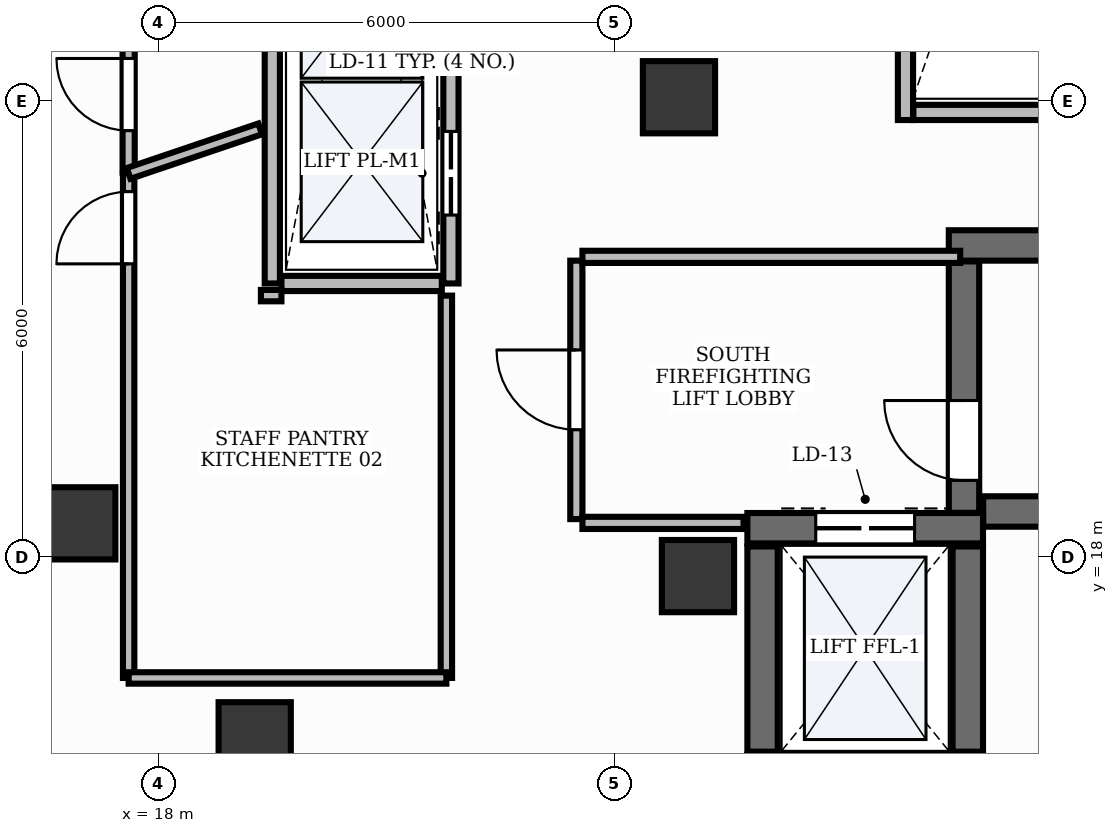
"""IFC4 building model, lengths in metres.
Left out: names, types, materials, properties, quantities, classifications, styles, units other than length and angle.
Written with IfcOpenShell. Run it as: python <this file> out.ifc"""

import sys

from ifc_helpers import new_model, si_unit, direction, frame, frame_2d, origin, origin_2d, place, context, subcontext, project, spatial, rectangle, extrude, element, fill, save


model = new_model("IFC4")
c1 = context("Model", 3, precision=1e-05, world=origin(), true_north=direction((0.0, 1.0)))
c2 = subcontext(c1, "Body", "Model", "MODEL_VIEW")
j1 = project(units=[si_unit("LENGTHUNIT", "METRE"), si_unit("PLANEANGLEUNIT", "RADIAN")], contexts=[c1])
p1 = place(None, origin())
s1 = spatial("IfcSite", under=j1, at=p1, CompositionType="ELEMENT")
p2 = place(p1, origin())
s2 = spatial("IfcBuilding", under=s1, at=p2, CompositionType="ELEMENT")
p3 = place(p2, frame((0.0, 0.0, 231.0)))
s3 = spatial("IfcBuildingStorey", under=s2, at=p3, CompositionType="ELEMENT", Elevation=231.0)
p4 = place(p3, frame((28.852, 18.6, 0.0), z_axis=(0.0, 0.0, 1.0), x_axis=(1.0, 0.0, 0.0)))
e1 = element("IfcWall", 1, at=p4, inside=s3, PredefinedType="SHEAR", context=c2, shape_type="SweptSolid", body=[
    extrude(rectangle(XDim=8.198, YDim=0.4, at=frame_2d((4.099, 0.0))), origin(), (0.0, 0.0, 1.0), 3.9),
])
p5 = place(p3, frame((28.4, 22.1, 0.0), z_axis=(0.0, 0.0, 1.0), x_axis=(1.0, 0.0, 0.0)))
e2 = element("IfcWall", 2, at=p5, inside=s3, PredefinedType="SHEAR", context=c2, shape_type="SweptSolid", body=[
    extrude(rectangle(XDim=8.65, YDim=0.4, at=frame_2d((4.325, 0.0))), origin(), (0.0, 0.0, 1.0), 3.9),
])
p6 = place(p3, frame((28.6, 18.582, 0.0), z_axis=(0.0, 0.0, 1.0), x_axis=(0.0, 1.0, 0.0)))
e3 = element("IfcWall", 3, at=p6, inside=s3, PredefinedType="SHEAR", context=c2, shape_type="SweptSolid", body=[
    extrude(rectangle(XDim=3.308, YDim=0.4, at=frame_2d((1.654, 0.0))), origin(), (0.0, 0.0, 1.0), 3.9),
])
p7 = place(p6, frame((0.428, 0.0, 0.0)))
e4 = element("IfcOpeningElement", 4, at=p7, cuts=e3, PredefinedType="OPENING", context=c2, shape_type="SweptSolid", body=[
    extrude(rectangle(XDim=1.05, YDim=2.15, at=frame_2d((0.525, 1.075))), frame((0.0, 0.215, 0.0), z_axis=(0.0, -1.0, 0.0), x_axis=(1.0, 0.0, 0.0)), (0.0, 0.0, 1.0), 0.43),
])
p8 = place(p3, frame((25.75, 18.38, 0.0), z_axis=(0.0, 0.0, 1.0), x_axis=(1.0, 0.0, 0.0)))
e5 = element("IfcWall", 5, at=p8, inside=s3, PredefinedType="SHEAR", context=c2, shape_type="SweptSolid", body=[
    extrude(rectangle(XDim=3.1, YDim=0.4, at=frame_2d((1.55, 0.0))), origin(), (0.0, 0.0, 1.0), 3.9),
])
p9 = place(p8, frame((0.9, 0.0, 0.0)))
e6 = element("IfcOpeningElement", 6, at=p9, cuts=e5, PredefinedType="OPENING", context=c2, shape_type="SweptSolid", body=[
    extrude(rectangle(XDim=1.3, YDim=2.2, at=frame_2d((0.65, 1.1))), frame((0.0, 0.215, 0.0), z_axis=(0.0, -1.0, 0.0), x_axis=(1.0, 0.0, 0.0)), (0.0, 0.0, 1.0), 0.43),
])
for number, where, z_axis, x_axis in (
    (7, (25.95, 15.44, 0.0), (0.0, 0.0, 1.0), (0.0, 1.0, 0.0)),
    (8, (28.65, 15.44, 0.0), (0.0, 0.0, 1.0), (0.0, 1.0, 0.0)),
):
    element("IfcWall", number, at=place(p3, frame(where, z_axis=z_axis, x_axis=x_axis)), inside=s3, PredefinedType="SHEAR", context=c2, shape_type="SweptSolid", body=[
        extrude(rectangle(XDim=2.7, YDim=0.4, at=frame_2d((1.35, 0.0))), origin(), (0.0, 0.0, 1.0), 3.9),
    ])
for number, where, z_axis, x_axis in (
    (9, (24.85, 24.05, -0.0), (0.0, 0.0, 1.0), (1.0, 0.0, 0.0)),
    (10, (25.1, 17.75, -0.0), (0.0, 0.0, 1.0), (1.0, 0.0, 0.0)),
):
    element("IfcColumn", number, at=place(p3, frame(where, z_axis=z_axis, x_axis=x_axis)), inside=s3, PredefinedType="PILASTER", context=c2, shape_type="SweptSolid", body=[
        extrude(rectangle(XDim=0.95, YDim=0.95, at=origin_2d()), origin(), (0.0, 0.0, 1.0), 3.901),
    ])
for number, where, z_axis, x_axis in (
    (11, (16.96, 18.444, -0.0), (0.0, 0.0, 1.0), (1.0, 0.0, 0.0)),
    (12, (19.268, 15.616, -0.0), (0.0, 0.0, 1.0), (1.0, 0.0, 0.0)),
):
    element("IfcColumn", number, at=place(p3, frame(where, z_axis=z_axis, x_axis=x_axis)), inside=s3, PredefinedType="COLUMN", context=c2, shape_type="SweptSolid", body=[
        extrude(rectangle(XDim=0.95, YDim=0.95, at=origin_2d()), origin(), (0.0, 0.0, 1.0), 3.901),
    ])
p10 = place(p3, frame((19.5, 21.6, 0.0), z_axis=(0.0, 0.0, 1.0), x_axis=(0.0, 1.0, 0.0)))
e13 = element("IfcWall", 13, at=p10, inside=s3, PredefinedType="PARTITIONING", context=c2, shape_type="SweptSolid", body=[
    extrude(rectangle(XDim=10.8, YDim=0.2, at=frame_2d((5.4, 0.0))), origin(), (0.0, 0.0, 1.0), 2.91),
])
p11 = place(p3, frame((21.85, 21.6, 0.0), z_axis=(0.0, 0.0, 1.0), x_axis=(0.0, 1.0, 0.0)))
e14 = element("IfcWall", 14, at=p11, inside=s3, PredefinedType="PARTITIONING", context=c2, shape_type="SweptSolid", body=[
    extrude(rectangle(XDim=10.8, YDim=0.2, at=frame_2d((5.4, 0.0))), origin(), (0.0, 0.0, 1.0), 2.91),
])
p12 = place(p11, frame((0.9, 0.0, 0.0)))
e15 = element("IfcOpeningElement", 15, at=p12, cuts=e14, PredefinedType="OPENING", context=c2, shape_type="SweptSolid", body=[
    extrude(rectangle(XDim=1.1, YDim=2.2, at=frame_2d((0.55, 1.1))), frame((0.0, 0.115, 0.0), z_axis=(0.0, -1.0, 0.0), x_axis=(1.0, 0.0, 0.0)), (0.0, 0.0, 1.0), 0.23),
])
p13 = place(p11, frame((3.6, 0.0, 0.0)))
e16 = element("IfcOpeningElement", 16, at=p13, cuts=e14, PredefinedType="OPENING", context=c2, shape_type="SweptSolid", body=[
    extrude(rectangle(XDim=1.1, YDim=2.2, at=frame_2d((0.55, 1.1))), frame((0.0, 0.115, 0.0), z_axis=(0.0, -1.0, 0.0), x_axis=(1.0, 0.0, 0.0)), (0.0, 0.0, 1.0), 0.23),
])
p14 = place(p11, frame((6.3, 0.0, 0.0)))
e17 = element("IfcOpeningElement", 17, at=p14, cuts=e14, PredefinedType="OPENING", context=c2, shape_type="SweptSolid", body=[
    extrude(rectangle(XDim=1.1, YDim=2.2, at=frame_2d((0.55, 1.1))), frame((0.0, 0.115, 0.0), z_axis=(0.0, -1.0, 0.0), x_axis=(1.0, 0.0, 0.0)), (0.0, 0.0, 1.0), 0.23),
])
p15 = place(p11, frame((9.0, 0.0, 0.0)))
e18 = element("IfcOpeningElement", 18, at=p15, cuts=e14, PredefinedType="OPENING", context=c2, shape_type="SweptSolid", body=[
    extrude(rectangle(XDim=1.1, YDim=2.2, at=frame_2d((0.55, 1.1))), frame((0.0, 0.115, 0.0), z_axis=(0.0, -1.0, 0.0), x_axis=(1.0, 0.0, 0.0)), (0.0, 0.0, 1.0), 0.23),
])
p16 = place(p3, frame((19.62, 21.6, 0.0), z_axis=(0.0, 0.0, 1.0), x_axis=(1.0, 0.0, 0.0)))
e19 = element("IfcWall", 19, at=p16, inside=s3, PredefinedType="PARTITIONING", context=c2, shape_type="SweptSolid", body=[
    extrude(rectangle(XDim=2.11, YDim=0.2, at=frame_2d((1.055, 0.0))), origin(), (0.0, 0.0, 1.0), 2.91),
])
p17 = place(p3, frame((27.83, 23.75, 0.0), z_axis=(0.0, 0.0, 1.0), x_axis=(0.0, 1.0, 0.0)))
e20 = element("IfcWall", 20, at=p17, inside=s3, PredefinedType="PARTITIONING", context=c2, shape_type="SweptSolid", body=[
    extrude(rectangle(XDim=1.366, YDim=0.2, at=frame_2d((0.683, 0.0))), origin(), (0.0, 0.0, 1.0), 2.91),
])
p18 = place(p3, frame((27.934, 23.85, 0.0), z_axis=(0.0, 0.0, 1.0), x_axis=(1.0, 0.0, 0.0)))
e21 = element("IfcWall", 21, at=p18, inside=s3, PredefinedType="PARTITIONING", context=c2, shape_type="SweptSolid", body=[
    extrude(rectangle(XDim=2.096, YDim=0.2, at=frame_2d((1.048, 0.0))), origin(), (0.0, 0.0, 1.0), 2.91),
])
p19 = place(p3, frame((23.5, 18.5, 0.0), z_axis=(0.0, 0.0, 1.0), x_axis=(0.0, 1.0, 0.0)))
e22 = element("IfcWall", 22, at=p19, inside=s3, PredefinedType="PARTITIONING", context=c2, shape_type="SweptSolid", body=[
    extrude(rectangle(XDim=3.4, YDim=0.16, at=frame_2d((1.7, 0.0))), origin(), (0.0, 0.0, 1.0), 2.91),
])
p20 = place(p19, frame((1.175, 0.0, 0.0)))
e23 = element("IfcOpeningElement", 23, at=p20, cuts=e22, PredefinedType="OPENING", context=c2, shape_type="SweptSolid", body=[
    extrude(rectangle(XDim=1.05, YDim=2.15, at=frame_2d((0.525, 1.075))), frame((0.0, 0.095, 0.0), z_axis=(0.0, -1.0, 0.0), x_axis=(1.0, 0.0, 0.0)), (0.0, 0.0, 1.0), 0.19),
])
p21 = place(p3, frame((23.58, 21.95, 0.0), z_axis=(0.0, 0.0, 1.0), x_axis=(1.0, 0.0, 0.0)))
e24 = element("IfcWall", 24, at=p21, inside=s3, PredefinedType="PARTITIONING", context=c2, shape_type="SweptSolid", body=[
    extrude(rectangle(XDim=4.97, YDim=0.16, at=frame_2d((2.485, 0.0))), origin(), (0.0, 0.0, 1.0), 2.91),
])
p22 = place(p3, frame((23.58, 18.45, 0.0), z_axis=(0.0, 0.0, 1.0), x_axis=(1.0, 0.0, 0.0)))
e25 = element("IfcWall", 25, at=p22, inside=s3, PredefinedType="PARTITIONING", context=c2, shape_type="SweptSolid", body=[
    extrude(rectangle(XDim=2.12, YDim=0.16, at=frame_2d((1.06, 0.0))), origin(), (0.0, 0.0, 1.0), 2.91),
])
p23 = place(p3, frame((17.61, 16.41, 0.0), z_axis=(0.0, 0.0, 1.0), x_axis=(0.0, 1.0, 0.0)))
e26 = element("IfcWall", 26, at=p23, inside=s3, PredefinedType="PARTITIONING", context=c2, shape_type="SweptSolid", body=[
    extrude(rectangle(XDim=6.638, YDim=0.15, at=frame_2d((3.319, 0.0))), origin(), (0.0, 0.0, 1.0), 2.91),
])
p24 = place(p23, frame((5.448, 0.0, 0.0)))
e27 = element("IfcOpeningElement", 27, at=p24, cuts=e26, PredefinedType="OPENING", context=c2, shape_type="SweptSolid", body=[
    extrude(rectangle(XDim=0.95, YDim=2.15, at=frame_2d((0.475, 1.075))), frame((0.0, 0.09, 0.0), z_axis=(0.0, -1.0, 0.0), x_axis=(1.0, 0.0, 0.0)), (0.0, 0.0, 1.0), 0.18),
])
p25 = place(p3, frame((17.61, 23.058, 0.0), z_axis=(0.0, 0.0, 1.0), x_axis=(0.0, 1.0, 0.0)))
e28 = element("IfcWall", 28, at=p25, inside=s3, PredefinedType="PARTITIONING", context=c2, shape_type="SweptSolid", body=[
    extrude(rectangle(XDim=8.732, YDim=0.16, at=frame_2d((4.366, 0.0))), origin(), (0.0, 0.0, 1.0), 2.91),
])
p26 = place(p25, frame((0.552, 0.0, 0.0)))
e29 = element("IfcOpeningElement", 29, at=p26, cuts=e28, PredefinedType="OPENING", context=c2, shape_type="SweptSolid", body=[
    extrude(rectangle(XDim=0.95, YDim=2.15, at=frame_2d((0.475, 1.075))), frame((0.0, 0.095, 0.0), z_axis=(0.0, -1.0, 0.0), x_axis=(1.0, 0.0, 0.0)), (0.0, 0.0, 1.0), 0.19),
])
p27 = place(p3, frame((19.35, 21.44, 0.0), z_axis=(0.0, 0.0, 1.0), x_axis=(1.0, 0.0, 0.0)))
e30 = element("IfcWall", 30, at=p27, inside=s3, PredefinedType="PARTITIONING", context=c2, shape_type="SweptSolid", body=[
    extrude(rectangle(XDim=0.27, YDim=0.15, at=frame_2d((0.135, 0.0))), origin(), (0.0, 0.0, 1.0), 2.91),
])
p28 = place(p3, frame((21.79, 21.44, 0.0), z_axis=(0.0, 0.0, 1.0), x_axis=(0.0, -1.0, 0.0)))
e31 = element("IfcWall", 31, at=p28, inside=s3, PredefinedType="PARTITIONING", context=c2, shape_type="SweptSolid", body=[
    extrude(rectangle(XDim=5.03, YDim=0.15, at=frame_2d((2.515, 0.0))), origin(), (0.0, 0.0, 1.0), 2.91),
])
p29 = place(p3, frame((21.79, 16.41, 0.0), z_axis=(0.0, 0.0, 1.0), x_axis=(-1.0, 0.0, 0.0)))
e32 = element("IfcWall", 32, at=p29, inside=s3, PredefinedType="PARTITIONING", context=c2, shape_type="SweptSolid", body=[
    extrude(rectangle(XDim=4.18, YDim=0.15, at=frame_2d((2.09, 0.0))), origin(), (0.0, 0.0, 1.0), 2.91),
])
p30 = place(p3, frame((17.61, 23.048, 0.0), z_axis=(0.0, 0.0, 1.0), x_axis=(0.9472297082, 0.320555580054, 0.0)))
e33 = element("IfcWall", 33, at=p30, inside=s3, PredefinedType="PARTITIONING", context=c2, shape_type="SweptSolid", body=[
    extrude(rectangle(XDim=1.826, YDim=0.15, at=frame_2d((0.913, 0.0))), origin(), (0.0, 0.0, 1.0), 2.91),
])
p31 = place(p7, origin())
e34 = element("IfcDoor", 34, at=p31, inside=s3, OperationType="SINGLE_SWING_RIGHT", PredefinedType="DOOR", context=c2, shape_type="SweptSolid", body=[
    extrude(rectangle(XDim=1.05, YDim=2.15, at=frame_2d((0.525, 1.075))), frame((0.0, 0.025, 0.0), z_axis=(0.0, -1.0, 0.0), x_axis=(1.0, 0.0, 0.0)), (0.0, 0.0, 1.0), 0.05),
])
fill(e4, e34)
p32 = place(p12, origin())
e35 = element("IfcDoor", 35, at=p32, inside=s3, OperationType="DOUBLE_DOOR_SLIDING", PredefinedType="DOOR", context=c2, shape_type="SweptSolid", body=[
    extrude(rectangle(XDim=1.1, YDim=2.2, at=frame_2d((0.55, 1.1))), frame((0.0, 0.025, 0.0), z_axis=(0.0, -1.0, 0.0), x_axis=(1.0, 0.0, 0.0)), (0.0, 0.0, 1.0), 0.05),
])
fill(e15, e35)
p33 = place(p9, origin())
e36 = element("IfcDoor", 36, at=p33, inside=s3, OperationType="DOUBLE_DOOR_SLIDING", PredefinedType="DOOR", context=c2, shape_type="SweptSolid", body=[
    extrude(rectangle(XDim=1.3, YDim=2.2, at=frame_2d((0.65, 1.1))), frame((0.0, 0.025, 0.0), z_axis=(0.0, -1.0, 0.0), x_axis=(1.0, 0.0, 0.0)), (0.0, 0.0, 1.0), 0.05),
])
fill(e6, e36)
p34 = place(p20, origin())
e37 = element("IfcDoor", 37, at=p34, inside=s3, OperationType="SINGLE_SWING_RIGHT", PredefinedType="DOOR", context=c2, shape_type="SweptSolid", body=[
    extrude(rectangle(XDim=1.05, YDim=2.15, at=frame_2d((0.525, 1.075))), frame((0.0, 0.025, 0.0), z_axis=(0.0, -1.0, 0.0), x_axis=(1.0, 0.0, 0.0)), (0.0, 0.0, 1.0), 0.05),
])
fill(e23, e37)
p35 = place(p24, origin())
e38 = element("IfcDoor", 38, at=p35, inside=s3, OperationType="SINGLE_SWING_LEFT", PredefinedType="DOOR", context=c2, shape_type="SweptSolid", body=[
    extrude(rectangle(XDim=0.95, YDim=2.15, at=frame_2d((0.475, 1.075))), frame((0.0, 0.025, 0.0), z_axis=(0.0, -1.0, 0.0), x_axis=(1.0, 0.0, 0.0)), (0.0, 0.0, 1.0), 0.05),
])
fill(e27, e38)
p36 = place(p26, origin())
e39 = element("IfcDoor", 39, at=p36, inside=s3, OperationType="SINGLE_SWING_RIGHT", PredefinedType="DOOR", context=c2, shape_type="SweptSolid", body=[
    extrude(rectangle(XDim=0.95, YDim=2.15, at=frame_2d((0.475, 1.075))), frame((0.0, 0.025, 0.0), z_axis=(0.0, -1.0, 0.0), x_axis=(1.0, 0.0, 0.0)), (0.0, 0.0, 1.0), 0.05),
])
fill(e29, e39)
save(model, sys.argv[1])
